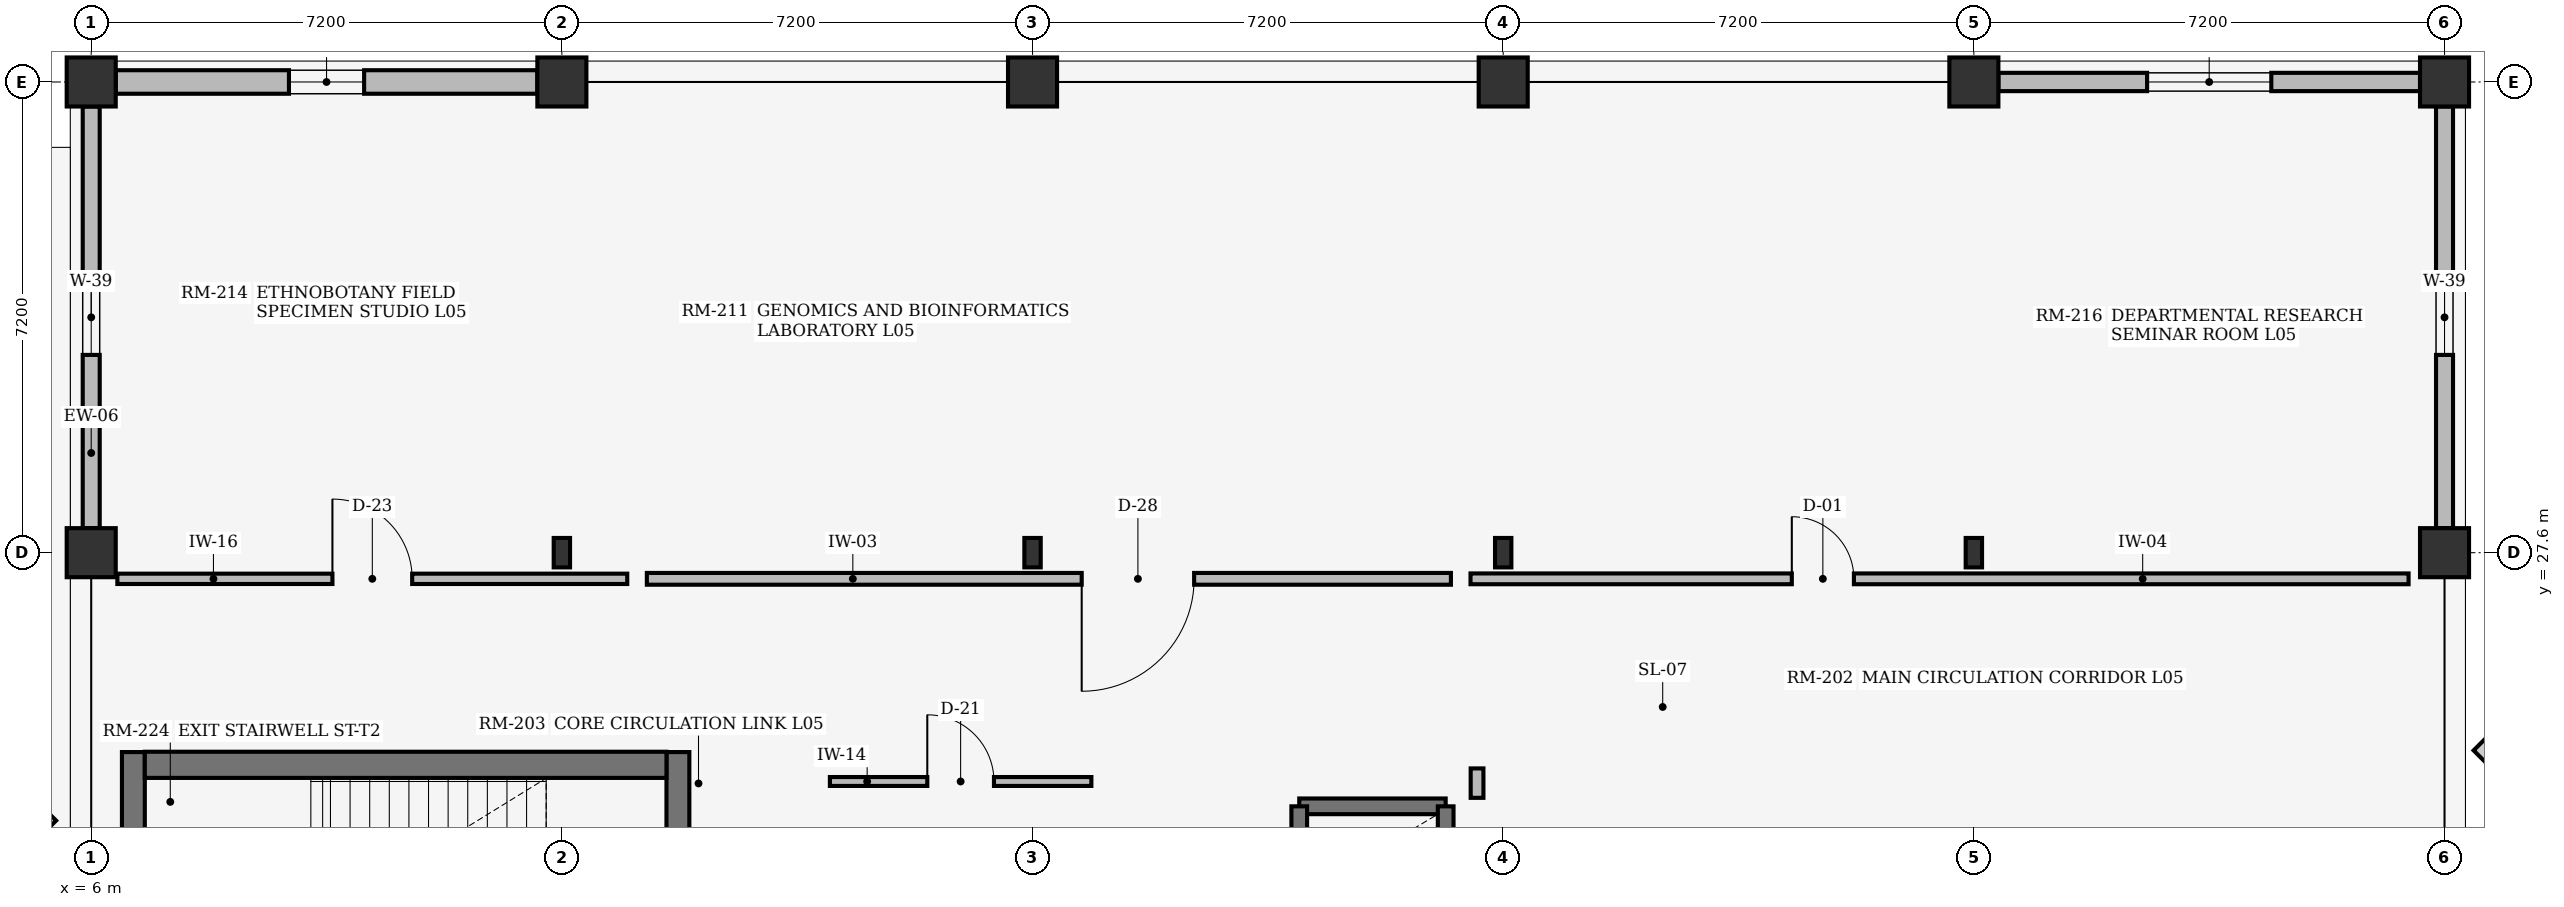
"""IFC4 building model, lengths in metres.
Left out: names, types, materials, properties, quantities, classifications, styles, units other than length and angle.
Written with IfcOpenShell. Run it as: python <this file> out.ifc"""

import sys

from ifc_helpers import new_model, si_unit, direction, frame, frame_2d, origin, origin_2d, place, context, subcontext, project, spatial, rectangle, i_section, extrude, element, fill, save


model = new_model("IFC4")
c1 = context("Model", 3, precision=1e-05, world=origin(), true_north=direction((0.0, 1.0)))
c2 = subcontext(c1, "Body", "Model", "MODEL_VIEW")
j1 = project(units=[si_unit("LENGTHUNIT", "METRE"), si_unit("PLANEANGLEUNIT", "RADIAN")], contexts=[c1])
p1 = place(None, origin())
s1 = spatial("IfcSite", under=j1, at=p1, CompositionType="ELEMENT")
p2 = place(p1, origin())
s2 = spatial("IfcBuilding", under=s1, at=p2, CompositionType="ELEMENT")
p3 = place(p2, frame((0.0, 0.0, 21.0)))
s3 = spatial("IfcBuildingStorey", under=s2, at=p3, CompositionType="ELEMENT", Elevation=21.0)
for number, where, z_axis, x_axis in (
    (1, (6.0, 27.6, 0.0), (0.0, 0.0, 1.0), (1.0, 0.0, 0.0)),
    (2, (6.0, 34.8, 0.0), (0.0, 0.0, 1.0), (1.0, 0.0, 0.0)),
):
    element("IfcColumn", number, at=place(p3, frame(where, z_axis=z_axis, x_axis=x_axis)), inside=s3, PredefinedType="COLUMN", context=c2, shape_type="SweptSolid", body=[
        extrude(rectangle(XDim=0.75, YDim=0.75, at=origin_2d()), origin(), (0.0, 0.0, 1.0), 3.67),
    ])
p4 = place(p3, frame((13.2, 27.6, 0.0), z_axis=(0.0, 0.0, 1.0), x_axis=(1.0, 0.0, 0.0)))
e3 = element("IfcColumn", 3, at=p4, inside=s3, PredefinedType="COLUMN", context=c2, shape_type="SweptSolid", body=[
    extrude(i_section(OverallWidth=0.25, OverallDepth=0.45, WebThickness=0.011, FlangeThickness=0.014, at=origin_2d()), origin(), (0.0, 0.0, 1.0), 3.67),
])
p5 = place(p3, frame((13.2, 34.8, 0.0), z_axis=(0.0, 0.0, 1.0), x_axis=(1.0, 0.0, 0.0)))
e4 = element("IfcColumn", 4, at=p5, inside=s3, PredefinedType="COLUMN", context=c2, shape_type="SweptSolid", body=[
    extrude(rectangle(XDim=0.75, YDim=0.75, at=origin_2d()), origin(), (0.0, 0.0, 1.0), 3.67),
])
p6 = place(p3, frame((20.4, 27.6, 0.0), z_axis=(0.0, 0.0, 1.0), x_axis=(1.0, 0.0, 0.0)))
e5 = element("IfcColumn", 5, at=p6, inside=s3, PredefinedType="COLUMN", context=c2, shape_type="SweptSolid", body=[
    extrude(i_section(OverallWidth=0.25, OverallDepth=0.45, WebThickness=0.011, FlangeThickness=0.014, at=origin_2d()), origin(), (0.0, 0.0, 1.0), 3.67),
])
p7 = place(p3, frame((20.4, 34.8, 0.0), z_axis=(0.0, 0.0, 1.0), x_axis=(1.0, 0.0, 0.0)))
e6 = element("IfcColumn", 6, at=p7, inside=s3, PredefinedType="COLUMN", context=c2, shape_type="SweptSolid", body=[
    extrude(rectangle(XDim=0.75, YDim=0.75, at=origin_2d()), origin(), (0.0, 0.0, 1.0), 3.67),
])
p8 = place(p3, frame((27.6, 27.6, 0.0), z_axis=(0.0, 0.0, 1.0), x_axis=(1.0, 0.0, 0.0)))
e7 = element("IfcColumn", 7, at=p8, inside=s3, PredefinedType="COLUMN", context=c2, shape_type="SweptSolid", body=[
    extrude(i_section(OverallWidth=0.25, OverallDepth=0.45, WebThickness=0.011, FlangeThickness=0.014, at=origin_2d()), origin(), (0.0, 0.0, 1.0), 3.67),
])
p9 = place(p3, frame((27.6, 34.8, 0.0), z_axis=(0.0, 0.0, 1.0), x_axis=(1.0, 0.0, 0.0)))
e8 = element("IfcColumn", 8, at=p9, inside=s3, PredefinedType="COLUMN", context=c2, shape_type="SweptSolid", body=[
    extrude(rectangle(XDim=0.75, YDim=0.75, at=origin_2d()), origin(), (0.0, 0.0, 1.0), 3.67),
])
p10 = place(p3, frame((34.8, 27.6, 0.0), z_axis=(0.0, 0.0, 1.0), x_axis=(1.0, 0.0, 0.0)))
e9 = element("IfcColumn", 9, at=p10, inside=s3, PredefinedType="COLUMN", context=c2, shape_type="SweptSolid", body=[
    extrude(i_section(OverallWidth=0.25, OverallDepth=0.45, WebThickness=0.011, FlangeThickness=0.014, at=origin_2d()), origin(), (0.0, 0.0, 1.0), 3.67),
])
for number, where, z_axis, x_axis in (
    (10, (34.8, 34.8, 0.0), (0.0, 0.0, 1.0), (1.0, 0.0, 0.0)),
    (11, (42.0, 27.6, 0.0), (0.0, 0.0, 1.0), (1.0, 0.0, 0.0)),
    (12, (42.0, 34.8, 0.0), (0.0, 0.0, 1.0), (1.0, 0.0, 0.0)),
):
    element("IfcColumn", number, at=place(p3, frame(where, z_axis=z_axis, x_axis=x_axis)), inside=s3, PredefinedType="COLUMN", context=c2, shape_type="SweptSolid", body=[
        extrude(rectangle(XDim=0.75, YDim=0.75, at=origin_2d()), origin(), (0.0, 0.0, 1.0), 3.67),
    ])
p11 = place(p3, frame((6.375, 34.8, 0.0), z_axis=(0.0, 0.0, 1.0), x_axis=(1.0, 0.0, 0.0)))
e13 = element("IfcWall", 13, at=p11, inside=s3, PredefinedType="STANDARD", context=c2, shape_type="SweptSolid", body=[
    extrude(rectangle(XDim=6.45, YDim=0.36, at=frame_2d((3.225, 0.0))), origin(), (0.0, 0.0, 1.0), 3.05),
])
p12 = place(p11, frame((2.65, 0.0, 0.75)))
e14 = element("IfcOpeningElement", 14, at=p12, cuts=e13, PredefinedType="OPENING", context=c2, shape_type="SweptSolid", body=[
    extrude(rectangle(XDim=1.15, YDim=1.35, at=frame_2d((0.575, 0.675))), frame((0.0, 0.19, 0.0), z_axis=(0.0, -1.0, 0.0), x_axis=(1.0, 0.0, 0.0)), (0.0, 0.0, 1.0), 0.38),
])
p13 = place(p3, frame((35.175, 34.8, 0.0), z_axis=(0.0, 0.0, 1.0), x_axis=(1.0, 0.0, 0.0)))
e15 = element("IfcWall", 15, at=p13, inside=s3, PredefinedType="STANDARD", context=c2, shape_type="SweptSolid", body=[
    extrude(rectangle(XDim=6.45, YDim=0.28, at=frame_2d((3.225, 0.0))), origin(), (0.0, 0.0, 1.0), 3.05),
])
p14 = place(p13, frame((2.275, 0.0, 0.75)))
e16 = element("IfcOpeningElement", 16, at=p14, cuts=e15, PredefinedType="OPENING", context=c2, shape_type="SweptSolid", body=[
    extrude(rectangle(XDim=1.9, YDim=1.35, at=frame_2d((0.95, 0.675))), frame((0.0, 0.15, 0.0), z_axis=(0.0, -1.0, 0.0), x_axis=(1.0, 0.0, 0.0)), (0.0, 0.0, 1.0), 0.3),
])
p15 = place(p3, frame((6.0, 27.975, 0.0), z_axis=(0.0, 0.0, 1.0), x_axis=(0.0, 1.0, 0.0)))
e17 = element("IfcWall", 17, at=p15, inside=s3, PredefinedType="STANDARD", context=c2, shape_type="SweptSolid", body=[
    extrude(rectangle(XDim=6.45, YDim=0.26, at=frame_2d((3.225, 0.0))), origin(), (0.0, 0.0, 1.0), 3.05),
])
p16 = place(p15, frame((2.65, 0.0, 0.75)))
e18 = element("IfcOpeningElement", 18, at=p16, cuts=e17, PredefinedType="OPENING", context=c2, shape_type="SweptSolid", body=[
    extrude(rectangle(XDim=1.15, YDim=1.5, at=frame_2d((0.575, 0.75))), frame((0.0, 0.14, 0.0), z_axis=(0.0, -1.0, 0.0), x_axis=(1.0, 0.0, 0.0)), (0.0, 0.0, 1.0), 0.28),
])
p17 = place(p3, frame((42.0, 27.975, 0.0), z_axis=(0.0, 0.0, 1.0), x_axis=(0.0, 1.0, 0.0)))
e19 = element("IfcWall", 19, at=p17, inside=s3, PredefinedType="STANDARD", context=c2, shape_type="SweptSolid", body=[
    extrude(rectangle(XDim=6.45, YDim=0.26, at=frame_2d((3.225, 0.0))), origin(), (0.0, 0.0, 1.0), 3.05),
])
p18 = place(p17, frame((2.65, 0.0, 0.75)))
e20 = element("IfcOpeningElement", 20, at=p18, cuts=e19, PredefinedType="OPENING", context=c2, shape_type="SweptSolid", body=[
    extrude(rectangle(XDim=1.15, YDim=1.5, at=frame_2d((0.575, 0.75))), frame((0.0, 0.14, 0.0), z_axis=(0.0, -1.0, 0.0), x_axis=(1.0, 0.0, 0.0)), (0.0, 0.0, 1.0), 0.28),
])
p19 = place(p3, frame((14.975, 24.55, 0.0), z_axis=(0.0, 0.0, 1.0), x_axis=(0.0, -1.0, 0.0)))
e21 = element("IfcWall", 21, at=p19, inside=s3, PredefinedType="SHEAR", context=c2, shape_type="SweptSolid", body=[
    extrude(rectangle(XDim=4.59, YDim=0.35, at=frame_2d((2.295, 0.0))), origin(), (0.0, 0.0, 1.0), 3.67),
])
p20 = place(p19, frame((1.72, 0.0, 0.0)))
e22 = element("IfcOpeningElement", 22, at=p20, cuts=e21, PredefinedType="OPENING", context=c2, shape_type="SweptSolid", body=[
    extrude(rectangle(XDim=1.15, YDim=2.2, at=frame_2d((0.575, 1.1))), frame((0.0, 0.185, 0.0), z_axis=(0.0, -1.0, 0.0), x_axis=(1.0, 0.0, 0.0)), (0.0, 0.0, 1.0), 0.37),
])
p21 = place(p3, frame((6.645, 24.55, 0.0), z_axis=(0.0, 0.0, 1.0), x_axis=(0.0, -1.0, 0.0)))
e23 = element("IfcWall", 23, at=p21, inside=s3, PredefinedType="SHEAR", context=c2, shape_type="SweptSolid", body=[
    extrude(rectangle(XDim=4.59, YDim=0.35, at=frame_2d((2.295, 0.0))), origin(), (0.0, 0.0, 1.0), 3.67),
])
p22 = place(p3, frame((14.8, 24.355, 0.0), z_axis=(0.0, 0.0, 1.0), x_axis=(-1.0, 0.0, 0.0)))
e24 = element("IfcWall", 24, at=p22, inside=s3, PredefinedType="SHEAR", context=c2, shape_type="SweptSolid", body=[
    extrude(rectangle(XDim=7.98, YDim=0.4, at=frame_2d((3.99, 0.0))), origin(), (0.0, 0.0, 1.0), 3.67),
])
p23 = place(p3, frame((24.48, 23.72, 0.0), z_axis=(0.0, 0.0, 1.0), x_axis=(1.0, 0.0, 0.0)))
e25 = element("IfcWall", 25, at=p23, inside=s3, PredefinedType="SHEAR", context=c2, shape_type="SweptSolid", body=[
    extrude(rectangle(XDim=2.24, YDim=0.24, at=frame_2d((1.12, 0.0))), origin(), (0.0, 0.0, 1.0), 3.67),
])
for number, where, z_axis, x_axis in (
    (26, (24.48, 20.78, 0.0), (0.0, 0.0, 1.0), (0.0, 1.0, 0.0)),
    (27, (26.72, 20.78, 0.0), (0.0, 0.0, 1.0), (0.0, 1.0, 0.0)),
):
    element("IfcWall", number, at=place(p3, frame(where, z_axis=z_axis, x_axis=x_axis)), inside=s3, PredefinedType="SHEAR", context=c2, shape_type="SweptSolid", body=[
        extrude(rectangle(XDim=2.94, YDim=0.24, at=frame_2d((1.47, 0.0))), origin(), (0.0, 0.0, 1.0), 3.67),
    ])
p24 = place(p3, frame((17.3, 24.1, 0.0), z_axis=(0.0, 0.0, 1.0), x_axis=(1.0, 0.0, 0.0)))
e28 = element("IfcWall", 28, at=p24, inside=s3, PredefinedType="PARTITIONING", context=c2, shape_type="SweptSolid", body=[
    extrude(rectangle(XDim=4.0, YDim=0.136, at=frame_2d((2.0, 0.0))), origin(), (0.0, 0.0, 1.0), 3.65),
])
p25 = place(p24, frame((1.49, 0.0, 0.0)))
e29 = element("IfcOpeningElement", 29, at=p25, cuts=e28, PredefinedType="OPENING", context=c2, shape_type="SweptSolid", body=[
    extrude(rectangle(XDim=1.02, YDim=2.18, at=frame_2d((0.51, 1.09))), frame((0.0, 0.078, 0.0), z_axis=(0.0, -1.0, 0.0), x_axis=(1.0, 0.0, 0.0)), (0.0, 0.0, 1.0), 0.156),
])
p26 = place(p3, frame((6.4, 27.2, 0.0), z_axis=(0.0, 0.0, 1.0), x_axis=(1.0, 0.0, 0.0)))
e30 = element("IfcWall", 30, at=p26, inside=s3, PredefinedType="PARTITIONING", context=c2, shape_type="SweptSolid", body=[
    extrude(rectangle(XDim=7.8, YDim=0.158, at=frame_2d((3.9, 0.0))), origin(), (0.0, 0.0, 1.0), 3.65),
])
p27 = place(p26, frame((3.29, 0.0, 0.0)))
e31 = element("IfcOpeningElement", 31, at=p27, cuts=e30, PredefinedType="OPENING", context=c2, shape_type="SweptSolid", body=[
    extrude(rectangle(XDim=1.22, YDim=2.22, at=frame_2d((0.61, 1.11))), frame((0.0, 0.089, 0.0), z_axis=(0.0, -1.0, 0.0), x_axis=(1.0, 0.0, 0.0)), (0.0, 0.0, 1.0), 0.178),
])
p28 = place(p3, frame((27.2, 24.3, 0.0), z_axis=(0.0, 0.0, 1.0), x_axis=(0.0, -1.0, 0.0)))
e32 = element("IfcWall", 32, at=p28, inside=s3, PredefinedType="PARTITIONING", context=c2, shape_type="SweptSolid", body=[
    extrude(rectangle(XDim=0.45, YDim=0.195, at=frame_2d((0.225, 0.0))), origin(), (0.0, 0.0, 1.0), 3.65),
])
p29 = place(p3, frame((14.5, 27.2, 0.0), z_axis=(0.0, 0.0, 1.0), x_axis=(1.0, 0.0, 0.0)))
e33 = element("IfcWall", 33, at=p29, inside=s3, PredefinedType="PARTITIONING", context=c2, shape_type="SweptSolid", body=[
    extrude(rectangle(XDim=12.3, YDim=0.18, at=frame_2d((6.15, 0.0))), origin(), (0.0, 0.0, 1.0), 3.65),
])
p30 = place(p29, frame((6.652, 0.0, 0.0)))
e34 = element("IfcOpeningElement", 34, at=p30, cuts=e33, PredefinedType="OPENING", context=c2, shape_type="SweptSolid", body=[
    extrude(rectangle(XDim=1.72, YDim=2.32, at=frame_2d((0.86, 1.16))), frame((0.0, 0.1, 0.0), z_axis=(0.0, -1.0, 0.0), x_axis=(1.0, 0.0, 0.0)), (0.0, 0.0, 1.0), 0.2),
])
p31 = place(p3, frame((27.1, 27.2, 0.0), z_axis=(0.0, 0.0, 1.0), x_axis=(1.0, 0.0, 0.0)))
e35 = element("IfcWall", 35, at=p31, inside=s3, PredefinedType="PARTITIONING", context=c2, shape_type="SweptSolid", body=[
    extrude(rectangle(XDim=14.35, YDim=0.165, at=frame_2d((7.175, 0.0))), origin(), (0.0, 0.0, 1.0), 3.65),
])
p32 = place(p31, frame((4.915, 0.0, 0.0)))
e36 = element("IfcOpeningElement", 36, at=p32, cuts=e35, PredefinedType="OPENING", context=c2, shape_type="SweptSolid", body=[
    extrude(rectangle(XDim=0.95, YDim=2.15, at=frame_2d((0.475, 1.075))), frame((0.0, 0.093, 0.0), z_axis=(0.0, -1.0, 0.0), x_axis=(1.0, 0.0, 0.0)), (0.0, 0.0, 1.0), 0.185),
])
p33 = place(p12, origin())
e37 = element("IfcWindow", 37, at=p33, inside=s3, PartitioningType="SINGLE_PANEL", PredefinedType="WINDOW", context=c2, shape_type="SweptSolid", body=[
    extrude(rectangle(XDim=1.15, YDim=1.35, at=frame_2d((0.575, 0.675))), frame((0.0, 0.03, 0.0), z_axis=(0.0, -1.0, 0.0), x_axis=(1.0, 0.0, 0.0)), (0.0, 0.0, 1.0), 0.06),
])
fill(e14, e37)
p34 = place(p14, origin())
e38 = element("IfcWindow", 38, at=p34, inside=s3, PartitioningType="SINGLE_PANEL", PredefinedType="WINDOW", context=c2, shape_type="SweptSolid", body=[
    extrude(rectangle(XDim=1.9, YDim=1.35, at=frame_2d((0.95, 0.675))), frame((0.0, 0.03, 0.0), z_axis=(0.0, -1.0, 0.0), x_axis=(1.0, 0.0, 0.0)), (0.0, 0.0, 1.0), 0.06),
])
fill(e16, e38)
p35 = place(p16, origin())
e39 = element("IfcWindow", 39, at=p35, inside=s3, PartitioningType="SINGLE_PANEL", PredefinedType="WINDOW", context=c2, shape_type="SweptSolid", body=[
    extrude(rectangle(XDim=1.15, YDim=1.5, at=frame_2d((0.575, 0.75))), frame((0.0, 0.03, 0.0), z_axis=(0.0, -1.0, 0.0), x_axis=(1.0, 0.0, 0.0)), (0.0, 0.0, 1.0), 0.06),
])
fill(e18, e39)
p36 = place(p18, origin())
e40 = element("IfcWindow", 40, at=p36, inside=s3, PartitioningType="SINGLE_PANEL", PredefinedType="WINDOW", context=c2, shape_type="SweptSolid", body=[
    extrude(rectangle(XDim=1.15, YDim=1.5, at=frame_2d((0.575, 0.75))), frame((0.0, 0.03, 0.0), z_axis=(0.0, -1.0, 0.0), x_axis=(1.0, 0.0, 0.0)), (0.0, 0.0, 1.0), 0.06),
])
fill(e20, e40)
p37 = place(p25, origin())
e41 = element("IfcDoor", 41, at=p37, inside=s3, OperationType="SINGLE_SWING_LEFT", PredefinedType="DOOR", context=c2, shape_type="SweptSolid", body=[
    extrude(rectangle(XDim=1.02, YDim=2.18, at=frame_2d((0.51, 1.09))), frame((0.0, 0.025, 0.0), z_axis=(0.0, -1.0, 0.0), x_axis=(1.0, 0.0, 0.0)), (0.0, 0.0, 1.0), 0.05),
])
fill(e29, e41)
p38 = place(p27, origin())
e42 = element("IfcDoor", 42, at=p38, inside=s3, OperationType="SINGLE_SWING_LEFT", PredefinedType="DOOR", context=c2, shape_type="SweptSolid", body=[
    extrude(rectangle(XDim=1.22, YDim=2.22, at=frame_2d((0.61, 1.11))), frame((0.0, 0.025, 0.0), z_axis=(0.0, -1.0, 0.0), x_axis=(1.0, 0.0, 0.0)), (0.0, 0.0, 1.0), 0.05),
])
fill(e31, e42)
p39 = place(p30, frame((1.72, 0.0, 0.0), z_axis=(0.0, 0.0, 1.0), x_axis=(-1.0, 0.0, 0.0)))
e43 = element("IfcDoor", 43, at=p39, inside=s3, OperationType="DOUBLE_DOOR_SINGLE_SWING", PredefinedType="DOOR", context=c2, shape_type="SweptSolid", body=[
    extrude(rectangle(XDim=1.72, YDim=2.32, at=frame_2d((0.86, 1.16))), frame((0.0, 0.025, 0.0), z_axis=(0.0, -1.0, 0.0), x_axis=(1.0, 0.0, 0.0)), (0.0, 0.0, 1.0), 0.05),
])
fill(e34, e43)
p40 = place(p32, origin())
e44 = element("IfcDoor", 44, at=p40, inside=s3, OperationType="SINGLE_SWING_LEFT", PredefinedType="DOOR", context=c2, shape_type="SweptSolid", body=[
    extrude(rectangle(XDim=0.95, YDim=2.15, at=frame_2d((0.475, 1.075))), frame((0.0, 0.025, 0.0), z_axis=(0.0, -1.0, 0.0), x_axis=(1.0, 0.0, 0.0)), (0.0, 0.0, 1.0), 0.05),
])
fill(e36, e44)
save(model, sys.argv[1])
